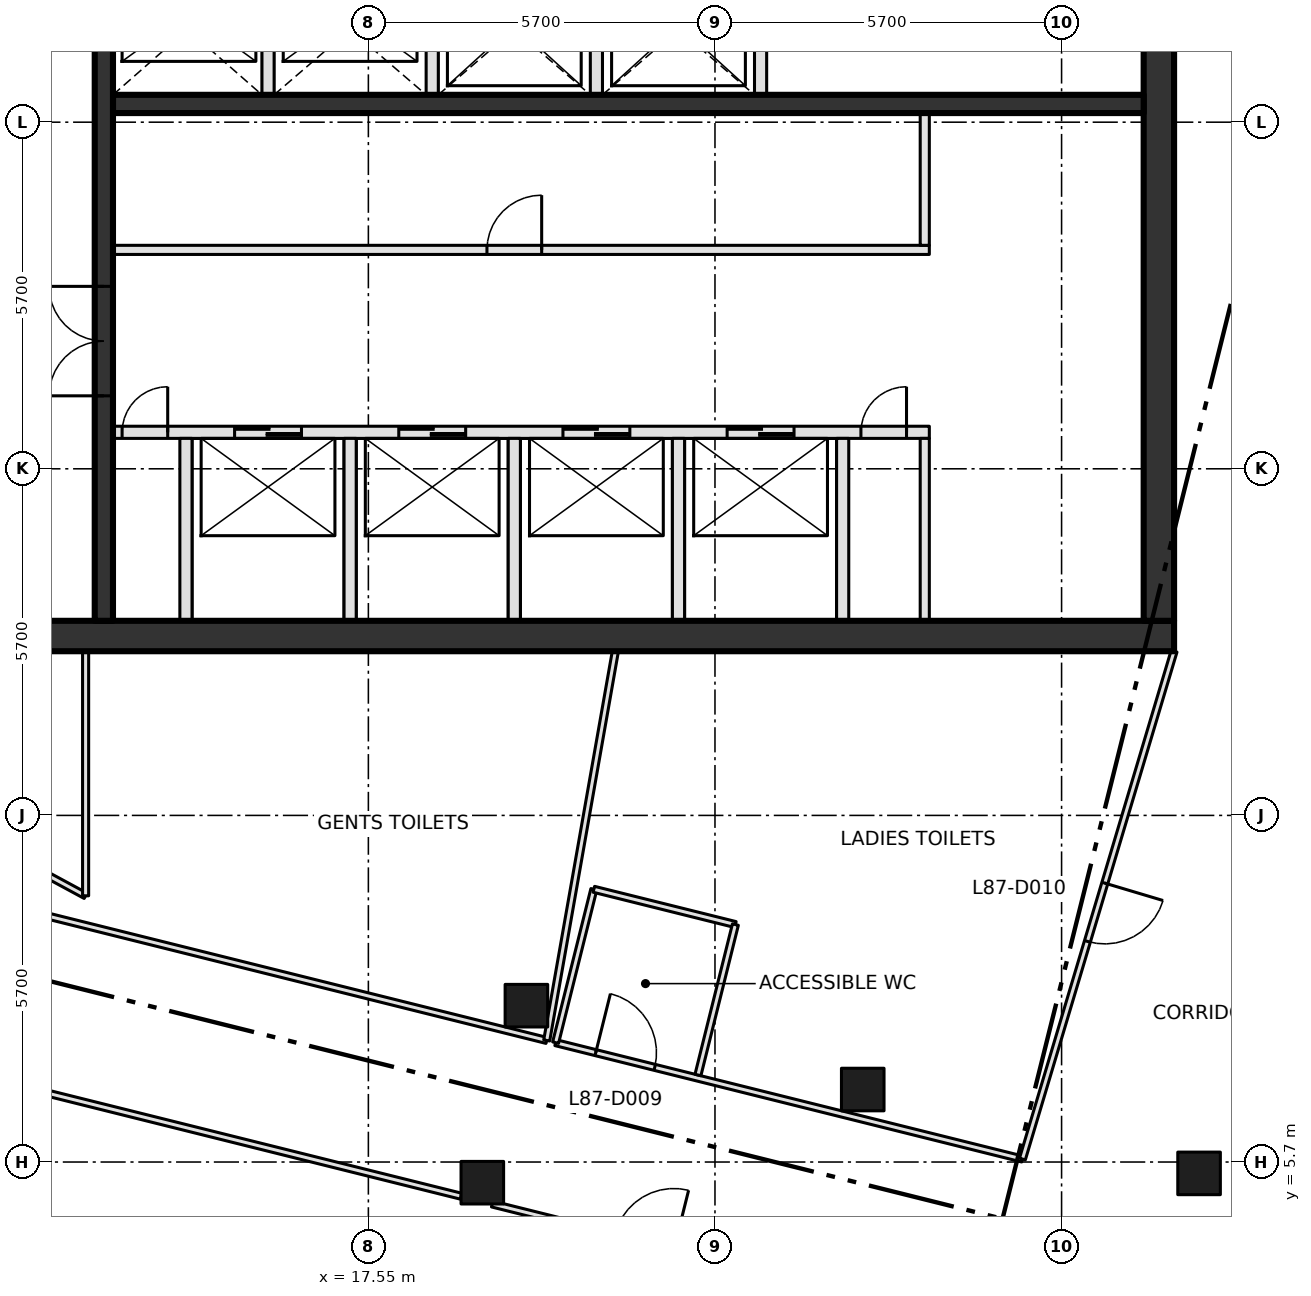
"""IFC4 building model, lengths in metres.
Left out: names, types, materials, properties, quantities, classifications, styles, units other than length and angle.
Written with IfcOpenShell. Run it as: python <this file> out.ifc"""

import sys

from ifc_helpers import new_model, si_unit, direction, frame, frame_2d, origin, origin_2d, place, context, subcontext, project, spatial, rectangle, extrude, element, fill, save


model = new_model("IFC4")
c1 = context("Model", 3, precision=1e-05, world=origin(), true_north=direction((0.0, 1.0)))
c2 = subcontext(c1, "Body", "Model", "MODEL_VIEW")
j1 = project(units=[si_unit("LENGTHUNIT", "METRE"), si_unit("PLANEANGLEUNIT", "RADIAN")], contexts=[c1])
p1 = place(None, origin())
s1 = spatial("IfcSite", under=j1, at=p1, CompositionType="ELEMENT")
p2 = place(p1, origin())
s2 = spatial("IfcBuilding", under=s1, at=p2, CompositionType="ELEMENT")
p3 = place(p2, frame((0.0, 0.0, 379.2)))
s3 = spatial("IfcBuildingStorey", under=s2, at=p3, CompositionType="ELEMENT", Elevation=379.2)
for number, where, z_axis, x_axis in (
    (1, (19.424, 5.36, 0.0), (0.0, 0.0, 1.0), (1.0, 0.0, 0.0)),
    (2, (20.149, 8.271, 0.0), (0.0, 0.0, 1.0), (1.0, 0.0, 0.0)),
    (3, (25.68, 6.892, 0.0), (0.0, 0.0, 1.0), (1.0, 0.0, 0.0)),
    (4, (31.211, 5.513, 0.0), (0.0, 0.0, 1.0), (1.0, 0.0, 0.0)),
):
    element("IfcColumn", number, at=place(p3, frame(where, z_axis=z_axis, x_axis=x_axis)), inside=s3, PredefinedType="COLUMN", context=c2, shape_type="SweptSolid", body=[
        extrude(rectangle(XDim=0.7, YDim=0.7, at=origin_2d()), origin(), (0.0, 0.0, 1.0), 4.2),
    ])
p4 = place(p3, frame((8.0, 14.35, -0.3), z_axis=(0.0, 0.0, 1.0), x_axis=(1.0, 0.0, 0.0)))
e5 = element("IfcWall", 5, at=p4, inside=s3, PredefinedType="SHEAR", context=c2, shape_type="SweptSolid", body=[
    extrude(rectangle(XDim=22.8, YDim=0.5, at=frame_2d((11.4, 0.0))), origin(), (0.0, 0.0, 1.0), 4.2),
])
p5 = place(p4, frame((2.3, 0.0, 0.3)))
e6 = element("IfcOpeningElement", 6, at=p5, cuts=e5, PredefinedType="OPENING", context=c2, shape_type="SweptSolid", body=[
    extrude(rectangle(XDim=1.8, YDim=2.1, at=frame_2d((0.9, 1.05))), frame((0.0, 0.26, 0.0), z_axis=(0.0, -1.0, 0.0), x_axis=(1.0, 0.0, 0.0)), (0.0, 0.0, 1.0), 0.52),
])
p6 = place(p3, frame((30.55, 14.6, -0.3), z_axis=(0.0, 0.0, 1.0), x_axis=(0.0, 1.0, 0.0)))
e7 = element("IfcWall", 7, at=p6, inside=s3, PredefinedType="SHEAR", context=c2, shape_type="SweptSolid", body=[
    extrude(rectangle(XDim=21.1, YDim=0.5, at=frame_2d((10.55, 0.0))), origin(), (0.0, 0.0, 1.0), 4.2),
])
p7 = place(p3, frame((13.35, 17.7, 0.0), z_axis=(0.0, 0.0, 1.0), x_axis=(1.0, 0.0, 0.0)))
e8 = element("IfcWall", 8, at=p7, inside=s3, PredefinedType="SOLIDWALL", context=c2, shape_type="SweptSolid", body=[
    extrude(rectangle(XDim=13.425, YDim=0.2, at=frame_2d((6.712, 0.0))), origin(), (0.0, 0.0, 1.0), 3.9),
])
p8 = place(p7, frame((2.0, 0.0, 0.0)))
e9 = element("IfcOpeningElement", 9, at=p8, cuts=e8, PredefinedType="OPENING", context=c2, shape_type="SweptSolid", body=[
    extrude(rectangle(XDim=1.1, YDim=2.1, at=frame_2d((0.55, 1.05))), frame((0.0, 0.11, 0.0), z_axis=(0.0, -1.0, 0.0), x_axis=(1.0, 0.0, 0.0)), (0.0, 0.0, 1.0), 0.22),
])
p9 = place(p7, frame((4.7, 0.0, 0.0)))
e10 = element("IfcOpeningElement", 10, at=p9, cuts=e8, PredefinedType="OPENING", context=c2, shape_type="SweptSolid", body=[
    extrude(rectangle(XDim=1.1, YDim=2.1, at=frame_2d((0.55, 1.05))), frame((0.0, 0.11, 0.0), z_axis=(0.0, -1.0, 0.0), x_axis=(1.0, 0.0, 0.0)), (0.0, 0.0, 1.0), 0.22),
])
p10 = place(p7, frame((7.4, 0.0, 0.0)))
e11 = element("IfcOpeningElement", 11, at=p10, cuts=e8, PredefinedType="OPENING", context=c2, shape_type="SweptSolid", body=[
    extrude(rectangle(XDim=1.1, YDim=2.1, at=frame_2d((0.55, 1.05))), frame((0.0, 0.11, 0.0), z_axis=(0.0, -1.0, 0.0), x_axis=(1.0, 0.0, 0.0)), (0.0, 0.0, 1.0), 0.22),
])
p11 = place(p7, frame((10.1, 0.0, 0.0)))
e12 = element("IfcOpeningElement", 12, at=p11, cuts=e8, PredefinedType="OPENING", context=c2, shape_type="SweptSolid", body=[
    extrude(rectangle(XDim=1.1, YDim=2.1, at=frame_2d((0.55, 1.05))), frame((0.0, 0.11, 0.0), z_axis=(0.0, -1.0, 0.0), x_axis=(1.0, 0.0, 0.0)), (0.0, 0.0, 1.0), 0.22),
])
p12 = place(p7, frame((0.15, 0.0, 0.0)))
e13 = element("IfcOpeningElement", 13, at=p12, cuts=e8, PredefinedType="OPENING", context=c2, shape_type="SweptSolid", body=[
    extrude(rectangle(XDim=0.75, YDim=2.1, at=frame_2d((0.375, 1.05))), frame((0.0, 0.11, 0.0), z_axis=(0.0, -1.0, 0.0), x_axis=(1.0, 0.0, 0.0)), (0.0, 0.0, 1.0), 0.22),
])
p13 = place(p7, frame((12.3, 0.0, 0.0)))
e14 = element("IfcOpeningElement", 14, at=p13, cuts=e8, PredefinedType="OPENING", context=c2, shape_type="SweptSolid", body=[
    extrude(rectangle(XDim=0.75, YDim=2.1, at=frame_2d((0.375, 1.05))), frame((0.0, 0.11, 0.0), z_axis=(0.0, -1.0, 0.0), x_axis=(1.0, 0.0, 0.0)), (0.0, 0.0, 1.0), 0.22),
])
p14 = place(p3, frame((13.35, 20.7, 0.0), z_axis=(0.0, 0.0, 1.0), x_axis=(1.0, 0.0, 0.0)))
e15 = element("IfcWall", 15, at=p14, inside=s3, PredefinedType="PARTITIONING", context=c2, shape_type="SweptSolid", body=[
    extrude(rectangle(XDim=13.425, YDim=0.15, at=frame_2d((6.712, 0.0))), origin(), (0.0, 0.0, 1.0), 3.9),
])
p15 = place(p14, frame((6.15, 0.0, 0.0)))
e16 = element("IfcOpeningElement", 16, at=p15, cuts=e15, PredefinedType="OPENING", context=c2, shape_type="SweptSolid", body=[
    extrude(rectangle(XDim=0.9, YDim=2.1, at=frame_2d((0.45, 1.05))), frame((0.0, 0.085, 0.0), z_axis=(0.0, -1.0, 0.0), x_axis=(1.0, 0.0, 0.0)), (0.0, 0.0, 1.0), 0.17),
])
p16 = place(p3, frame((13.35, 23.1, 0.0), z_axis=(0.0, 0.0, 1.0), x_axis=(1.0, 0.0, 0.0)))
e17 = element("IfcWall", 17, at=p16, inside=s3, PredefinedType="SHEAR", context=c2, shape_type="SweptSolid", body=[
    extrude(rectangle(XDim=16.95, YDim=0.3, at=frame_2d((8.475, 0.0))), origin(), (0.0, 0.0, 1.0), 3.9),
])
p17 = place(p3, frame((13.2, 14.6, 0.0), z_axis=(0.0, 0.0, 1.0), x_axis=(0.0, 1.0, 0.0)))
e18 = element("IfcWall", 18, at=p17, inside=s3, PredefinedType="SHEAR", context=c2, shape_type="SweptSolid", body=[
    extrude(rectangle(XDim=21.1, YDim=0.3, at=frame_2d((10.55, 0.0))), origin(), (0.0, 0.0, 1.0), 3.9),
])
p18 = place(p17, frame((3.7, 0.0, 0.0)))
e19 = element("IfcOpeningElement", 19, at=p18, cuts=e18, PredefinedType="OPENING", context=c2, shape_type="SweptSolid", body=[
    extrude(rectangle(XDim=1.8, YDim=2.1, at=frame_2d((0.9, 1.05))), frame((0.0, 0.16, 0.0), z_axis=(0.0, -1.0, 0.0), x_axis=(1.0, 0.0, 0.0)), (0.0, 0.0, 1.0), 0.32),
])
p19 = place(p17, frame((11.8, 0.0, 0.0)))
e20 = element("IfcOpeningElement", 20, at=p19, cuts=e18, PredefinedType="OPENING", context=c2, shape_type="SweptSolid", body=[
    extrude(rectangle(XDim=1.2, YDim=2.1, at=frame_2d((0.6, 1.05))), frame((0.0, 0.16, 0.0), z_axis=(0.0, -1.0, 0.0), x_axis=(1.0, 0.0, 0.0)), (0.0, 0.0, 1.0), 0.32),
])
p20 = place(p3, frame((14.55, 14.6, 0.0), z_axis=(0.0, 0.0, 1.0), x_axis=(0.0, 1.0, 0.0)))
e21 = element("IfcWall", 21, at=p20, inside=s3, PredefinedType="SOLIDWALL", context=c2, shape_type="SweptSolid", body=[
    extrude(rectangle(XDim=3.0, YDim=0.2, at=frame_2d((1.5, 0.0))), origin(), (0.0, 0.0, 1.0), 3.9),
])
p21 = place(p3, frame((15.9, 23.25, 0.0), z_axis=(0.0, 0.0, 1.0), x_axis=(0.0, 1.0, 0.0)))
e22 = element("IfcWall", 22, at=p21, inside=s3, PredefinedType="SOLIDWALL", context=c2, shape_type="SweptSolid", body=[
    extrude(rectangle(XDim=2.15, YDim=0.2, at=frame_2d((1.075, 0.0))), origin(), (0.0, 0.0, 1.0), 3.9),
])
p22 = place(p3, frame((17.25, 14.6, 0.0), z_axis=(0.0, 0.0, 1.0), x_axis=(0.0, 1.0, 0.0)))
e23 = element("IfcWall", 23, at=p22, inside=s3, PredefinedType="SOLIDWALL", context=c2, shape_type="SweptSolid", body=[
    extrude(rectangle(XDim=3.0, YDim=0.2, at=frame_2d((1.5, 0.0))), origin(), (0.0, 0.0, 1.0), 3.9),
])
p23 = place(p3, frame((18.6, 23.25, 0.0), z_axis=(0.0, 0.0, 1.0), x_axis=(0.0, 1.0, 0.0)))
e24 = element("IfcWall", 24, at=p23, inside=s3, PredefinedType="SOLIDWALL", context=c2, shape_type="SweptSolid", body=[
    extrude(rectangle(XDim=5.15, YDim=0.2, at=frame_2d((2.575, 0.0))), origin(), (0.0, 0.0, 1.0), 3.9),
])
p24 = place(p23, frame((3.15, 0.0, 0.0)))
e25 = element("IfcOpeningElement", 25, at=p24, cuts=e24, PredefinedType="OPENING", context=c2, shape_type="SweptSolid", body=[
    extrude(rectangle(XDim=1.2, YDim=2.1, at=frame_2d((0.6, 1.05))), frame((0.0, 0.11, 0.0), z_axis=(0.0, -1.0, 0.0), x_axis=(1.0, 0.0, 0.0)), (0.0, 0.0, 1.0), 0.22),
])
p25 = place(p3, frame((19.95, 14.6, 0.0), z_axis=(0.0, 0.0, 1.0), x_axis=(0.0, 1.0, 0.0)))
e26 = element("IfcWall", 26, at=p25, inside=s3, PredefinedType="SOLIDWALL", context=c2, shape_type="SweptSolid", body=[
    extrude(rectangle(XDim=3.0, YDim=0.2, at=frame_2d((1.5, 0.0))), origin(), (0.0, 0.0, 1.0), 3.9),
])
p26 = place(p3, frame((21.3, 23.25, 0.0), z_axis=(0.0, 0.0, 1.0), x_axis=(0.0, 1.0, 0.0)))
e27 = element("IfcWall", 27, at=p26, inside=s3, PredefinedType="SOLIDWALL", context=c2, shape_type="SweptSolid", body=[
    extrude(rectangle(XDim=2.15, YDim=0.2, at=frame_2d((1.075, 0.0))), origin(), (0.0, 0.0, 1.0), 3.9),
])
p27 = place(p3, frame((22.65, 14.6, 0.0), z_axis=(0.0, 0.0, 1.0), x_axis=(0.0, 1.0, 0.0)))
e28 = element("IfcWall", 28, at=p27, inside=s3, PredefinedType="SOLIDWALL", context=c2, shape_type="SweptSolid", body=[
    extrude(rectangle(XDim=3.0, YDim=0.2, at=frame_2d((1.5, 0.0))), origin(), (0.0, 0.0, 1.0), 3.9),
])
p28 = place(p3, frame((24.0, 23.25, 0.0), z_axis=(0.0, 0.0, 1.0), x_axis=(0.0, 1.0, 0.0)))
e29 = element("IfcWall", 29, at=p28, inside=s3, PredefinedType="SOLIDWALL", context=c2, shape_type="SweptSolid", body=[
    extrude(rectangle(XDim=2.15, YDim=0.2, at=frame_2d((1.075, 0.0))), origin(), (0.0, 0.0, 1.0), 3.9),
])
p29 = place(p3, frame((25.35, 14.6, 0.0), z_axis=(0.0, 0.0, 1.0), x_axis=(0.0, 1.0, 0.0)))
e30 = element("IfcWall", 30, at=p29, inside=s3, PredefinedType="SOLIDWALL", context=c2, shape_type="SweptSolid", body=[
    extrude(rectangle(XDim=3.0, YDim=0.2, at=frame_2d((1.5, 0.0))), origin(), (0.0, 0.0, 1.0), 3.9),
])
p30 = place(p3, frame((26.7, 14.6, 0.0), z_axis=(0.0, 0.0, 1.0), x_axis=(0.0, 1.0, 0.0)))
e31 = element("IfcWall", 31, at=p30, inside=s3, PredefinedType="PARTITIONING", context=c2, shape_type="SweptSolid", body=[
    extrude(rectangle(XDim=3.0, YDim=0.15, at=frame_2d((1.5, 0.0))), origin(), (0.0, 0.0, 1.0), 3.9),
])
p31 = place(p3, frame((26.7, 20.775, 0.0), z_axis=(0.0, 0.0, 1.0), x_axis=(0.0, 1.0, 0.0)))
e32 = element("IfcWall", 32, at=p31, inside=s3, PredefinedType="PARTITIONING", context=c2, shape_type="SweptSolid", body=[
    extrude(rectangle(XDim=2.175, YDim=0.15, at=frame_2d((1.087, 0.0))), origin(), (0.0, 0.0, 1.0), 3.9),
])
p32 = place(p3, frame((8.334, 7.815, 0.0), z_axis=(0.0, 0.0, 1.0), x_axis=(0.970312231044, -0.241855688968, 0.0)))
e33 = element("IfcWall", 33, at=p32, inside=s3, PredefinedType="PARTITIONING", context=c2, shape_type="SweptSolid", body=[
    extrude(rectangle(XDim=11.069, YDim=0.1, at=frame_2d((5.534, 0.0))), origin(), (0.0, 0.0, 1.0), 3.9),
])
p33 = place(p3, frame((9.9, 11.7, 0.0), z_axis=(0.0, 0.0, 1.0), x_axis=(0.87965147249, -0.475618846291, 0.0)))
e34 = element("IfcWall", 34, at=p33, inside=s3, PredefinedType="PARTITIONING", context=c2, shape_type="SweptSolid", body=[
    extrude(rectangle(XDim=3.41, YDim=0.1, at=frame_2d((1.705, 0.0))), origin(), (0.0, 0.0, 1.0), 3.9),
])
p34 = place(p3, frame((12.9, 10.078, 0.0), z_axis=(0.0, 0.0, 1.0), x_axis=(0.0, 1.0, 0.0)))
e35 = element("IfcWall", 35, at=p34, inside=s3, PredefinedType="PARTITIONING", context=c2, shape_type="SweptSolid", body=[
    extrude(rectangle(XDim=4.022, YDim=0.1, at=frame_2d((2.011, 0.0))), origin(), (0.0, 0.0, 1.0), 3.9),
])
p35 = place(p3, frame((19.586, 5.01, 0.0), z_axis=(0.0, 0.0, 1.0), x_axis=(0.970303347181, -0.241891327769, 0.0)))
e36 = element("IfcWall", 36, at=p35, inside=s3, PredefinedType="PARTITIONING", context=c2, shape_type="SweptSolid", body=[
    extrude(rectangle(XDim=5.172, YDim=0.1, at=frame_2d((2.586, 0.0))), origin(), (0.0, 0.0, 1.0), 3.9),
])
p36 = place(p35, frame((2.08, 0.0, 0.0)))
e37 = element("IfcOpeningElement", 37, at=p36, cuts=e36, PredefinedType="OPENING", context=c2, shape_type="SweptSolid", body=[
    extrude(rectangle(XDim=1.0, YDim=2.1, at=frame_2d((0.5, 1.05))), frame((0.0, 0.06, 0.0), z_axis=(0.0, -1.0, 0.0), x_axis=(1.0, 0.0, 0.0)), (0.0, 0.0, 1.0), 0.12),
])
p37 = place(p3, frame((20.483, 7.699, 0.0), z_axis=(0.0, 0.0, 1.0), x_axis=(-0.970288161847, 0.241952232846, 0.0)))
e38 = element("IfcWall", 38, at=p37, inside=s3, PredefinedType="PARTITIONING", context=c2, shape_type="SweptSolid", body=[
    extrude(rectangle(XDim=11.817, YDim=0.1, at=frame_2d((5.908, 0.0))), origin(), (0.0, 0.0, 1.0), 3.9),
])
p38 = place(p3, frame((20.629, 7.663, 0.0), z_axis=(0.0, 0.0, 1.0), x_axis=(0.970296588572, -0.241918437093, 0.0)))
e39 = element("IfcWall", 39, at=p38, inside=s3, PredefinedType="PARTITIONING", context=c2, shape_type="SweptSolid", body=[
    extrude(rectangle(XDim=7.912, YDim=0.1, at=frame_2d((3.956, 0.0))), origin(), (0.0, 0.0, 1.0), 3.9),
])
p39 = place(p38, frame((0.68, 0.0, 0.0)))
e40 = element("IfcOpeningElement", 40, at=p39, cuts=e39, PredefinedType="OPENING", context=c2, shape_type="SweptSolid", body=[
    extrude(rectangle(XDim=1.0, YDim=2.1, at=frame_2d((0.5, 1.05))), frame((0.0, 0.06, 0.0), z_axis=(0.0, -1.0, 0.0), x_axis=(1.0, 0.0, 0.0)), (0.0, 0.0, 1.0), 0.12),
])
p40 = place(p3, frame((30.8, 14.1, 0.0), z_axis=(0.0, 0.0, 1.0), x_axis=(-0.286170650389, -0.958178667502, 0.0)))
e41 = element("IfcWall", 41, at=p40, inside=s3, PredefinedType="PARTITIONING", context=c2, shape_type="SweptSolid", body=[
    extrude(rectangle(XDim=8.716, YDim=0.1, at=frame_2d((4.358, 0.0))), origin(), (0.0, 0.0, 1.0), 3.9),
])
p41 = place(p40, frame((3.98, 0.0, 0.0)))
e42 = element("IfcOpeningElement", 42, at=p41, cuts=e41, PredefinedType="OPENING", context=c2, shape_type="SweptSolid", body=[
    extrude(rectangle(XDim=1.0, YDim=2.1, at=frame_2d((0.5, 1.05))), frame((0.0, 0.06, 0.0), z_axis=(0.0, -1.0, 0.0), x_axis=(1.0, 0.0, 0.0)), (0.0, 0.0, 1.0), 0.12),
])
p42 = place(p3, frame((20.483, 7.699, 0.0), z_axis=(0.0, 0.0, 1.0), x_axis=(0.173716766884, 0.98479565642, 0.0)))
e43 = element("IfcWall", 43, at=p42, inside=s3, PredefinedType="PARTITIONING", context=c2, shape_type="SweptSolid", body=[
    extrude(rectangle(XDim=6.5, YDim=0.1, at=frame_2d((3.25, 0.0))), origin(), (0.0, 0.0, 1.0), 3.9),
])
p43 = place(p3, frame((20.629, 7.663, 0.0), z_axis=(0.0, 0.0, 1.0), x_axis=(0.242049385216, 0.970263930648, 0.0)))
e44 = element("IfcWall", 44, at=p43, inside=s3, PredefinedType="PARTITIONING", context=c2, shape_type="SweptSolid", body=[
    extrude(rectangle(XDim=2.599, YDim=0.1, at=frame_2d((1.3, 0.0))), origin(), (0.0, 0.0, 1.0), 3.9),
])
p44 = place(p3, frame((21.258, 10.185, 0.0), z_axis=(0.0, 0.0, 1.0), x_axis=(0.970327787359, -0.241793269299, 0.0)))
e45 = element("IfcWall", 45, at=p44, inside=s3, PredefinedType="PARTITIONING", context=c2, shape_type="SweptSolid", body=[
    extrude(rectangle(XDim=2.399, YDim=0.1, at=frame_2d((1.2, 0.0))), origin(), (0.0, 0.0, 1.0), 3.9),
])
p45 = place(p3, frame((23.586, 9.605, 0.0), z_axis=(0.0, 0.0, 1.0), x_axis=(-0.241611677547, -0.970373019654, 0.0)))
e46 = element("IfcWall", 46, at=p45, inside=s3, PredefinedType="PARTITIONING", context=c2, shape_type="SweptSolid", body=[
    extrude(rectangle(XDim=2.549, YDim=0.1, at=frame_2d((1.275, 0.0))), origin(), (0.0, 0.0, 1.0), 3.9),
])
p46 = place(p8, origin())
e47 = element("IfcDoor", 47, at=p46, inside=s3, OperationType="SLIDING_TO_LEFT", PredefinedType="DOOR", context=c2, shape_type="SweptSolid", body=[
    extrude(rectangle(XDim=1.1, YDim=2.1, at=frame_2d((0.55, 1.05))), frame((0.0, 0.025, 0.0), z_axis=(0.0, -1.0, 0.0), x_axis=(1.0, 0.0, 0.0)), (0.0, 0.0, 1.0), 0.05),
])
fill(e9, e47)
p47 = place(p9, origin())
e48 = element("IfcDoor", 48, at=p47, inside=s3, OperationType="SLIDING_TO_LEFT", PredefinedType="DOOR", context=c2, shape_type="SweptSolid", body=[
    extrude(rectangle(XDim=1.1, YDim=2.1, at=frame_2d((0.55, 1.05))), frame((0.0, 0.025, 0.0), z_axis=(0.0, -1.0, 0.0), x_axis=(1.0, 0.0, 0.0)), (0.0, 0.0, 1.0), 0.05),
])
fill(e10, e48)
p48 = place(p10, origin())
e49 = element("IfcDoor", 49, at=p48, inside=s3, OperationType="SLIDING_TO_LEFT", PredefinedType="DOOR", context=c2, shape_type="SweptSolid", body=[
    extrude(rectangle(XDim=1.1, YDim=2.1, at=frame_2d((0.55, 1.05))), frame((0.0, 0.025, 0.0), z_axis=(0.0, -1.0, 0.0), x_axis=(1.0, 0.0, 0.0)), (0.0, 0.0, 1.0), 0.05),
])
fill(e11, e49)
p49 = place(p11, origin())
e50 = element("IfcDoor", 50, at=p49, inside=s3, OperationType="SLIDING_TO_LEFT", PredefinedType="DOOR", context=c2, shape_type="SweptSolid", body=[
    extrude(rectangle(XDim=1.1, YDim=2.1, at=frame_2d((0.55, 1.05))), frame((0.0, 0.025, 0.0), z_axis=(0.0, -1.0, 0.0), x_axis=(1.0, 0.0, 0.0)), (0.0, 0.0, 1.0), 0.05),
])
fill(e12, e50)
p50 = place(p12, origin())
e51 = element("IfcDoor", 51, at=p50, inside=s3, OperationType="SINGLE_SWING_RIGHT", PredefinedType="DOOR", context=c2, shape_type="SweptSolid", body=[
    extrude(rectangle(XDim=0.75, YDim=2.1, at=frame_2d((0.375, 1.05))), frame((0.0, 0.025, 0.0), z_axis=(0.0, -1.0, 0.0), x_axis=(1.0, 0.0, 0.0)), (0.0, 0.0, 1.0), 0.05),
])
fill(e13, e51)
p51 = place(p13, origin())
e52 = element("IfcDoor", 52, at=p51, inside=s3, OperationType="SINGLE_SWING_RIGHT", PredefinedType="DOOR", context=c2, shape_type="SweptSolid", body=[
    extrude(rectangle(XDim=0.75, YDim=2.1, at=frame_2d((0.375, 1.05))), frame((0.0, 0.025, 0.0), z_axis=(0.0, -1.0, 0.0), x_axis=(1.0, 0.0, 0.0)), (0.0, 0.0, 1.0), 0.05),
])
fill(e14, e52)
p52 = place(p15, origin())
e53 = element("IfcDoor", 53, at=p52, inside=s3, OperationType="SINGLE_SWING_RIGHT", PredefinedType="DOOR", context=c2, shape_type="SweptSolid", body=[
    extrude(rectangle(XDim=0.9, YDim=2.1, at=frame_2d((0.45, 1.05))), frame((0.0, 0.025, 0.0), z_axis=(0.0, -1.0, 0.0), x_axis=(1.0, 0.0, 0.0)), (0.0, 0.0, 1.0), 0.05),
])
fill(e16, e53)
p53 = place(p18, origin())
e54 = element("IfcDoor", 54, at=p53, inside=s3, OperationType="DOUBLE_DOOR_SINGLE_SWING", PredefinedType="DOOR", context=c2, shape_type="SweptSolid", body=[
    extrude(rectangle(XDim=1.8, YDim=2.1, at=frame_2d((0.9, 1.05))), frame((0.0, 0.025, 0.0), z_axis=(0.0, -1.0, 0.0), x_axis=(1.0, 0.0, 0.0)), (0.0, 0.0, 1.0), 0.05),
])
fill(e19, e54)
p54 = place(p39, origin())
e55 = element("IfcDoor", 55, at=p54, inside=s3, OperationType="SINGLE_SWING_LEFT", PredefinedType="DOOR", context=c2, shape_type="SweptSolid", body=[
    extrude(rectangle(XDim=1.0, YDim=2.1, at=frame_2d((0.5, 1.05))), frame((0.0, 0.025, 0.0), z_axis=(0.0, -1.0, 0.0), x_axis=(1.0, 0.0, 0.0)), (0.0, 0.0, 1.0), 0.05),
])
fill(e40, e55)
p55 = place(p41, origin())
e56 = element("IfcDoor", 56, at=p55, inside=s3, OperationType="SINGLE_SWING_LEFT", PredefinedType="DOOR", context=c2, shape_type="SweptSolid", body=[
    extrude(rectangle(XDim=1.0, YDim=2.1, at=frame_2d((0.5, 1.05))), frame((0.0, 0.025, 0.0), z_axis=(0.0, -1.0, 0.0), x_axis=(1.0, 0.0, 0.0)), (0.0, 0.0, 1.0), 0.05),
])
fill(e42, e56)
save(model, sys.argv[1])
